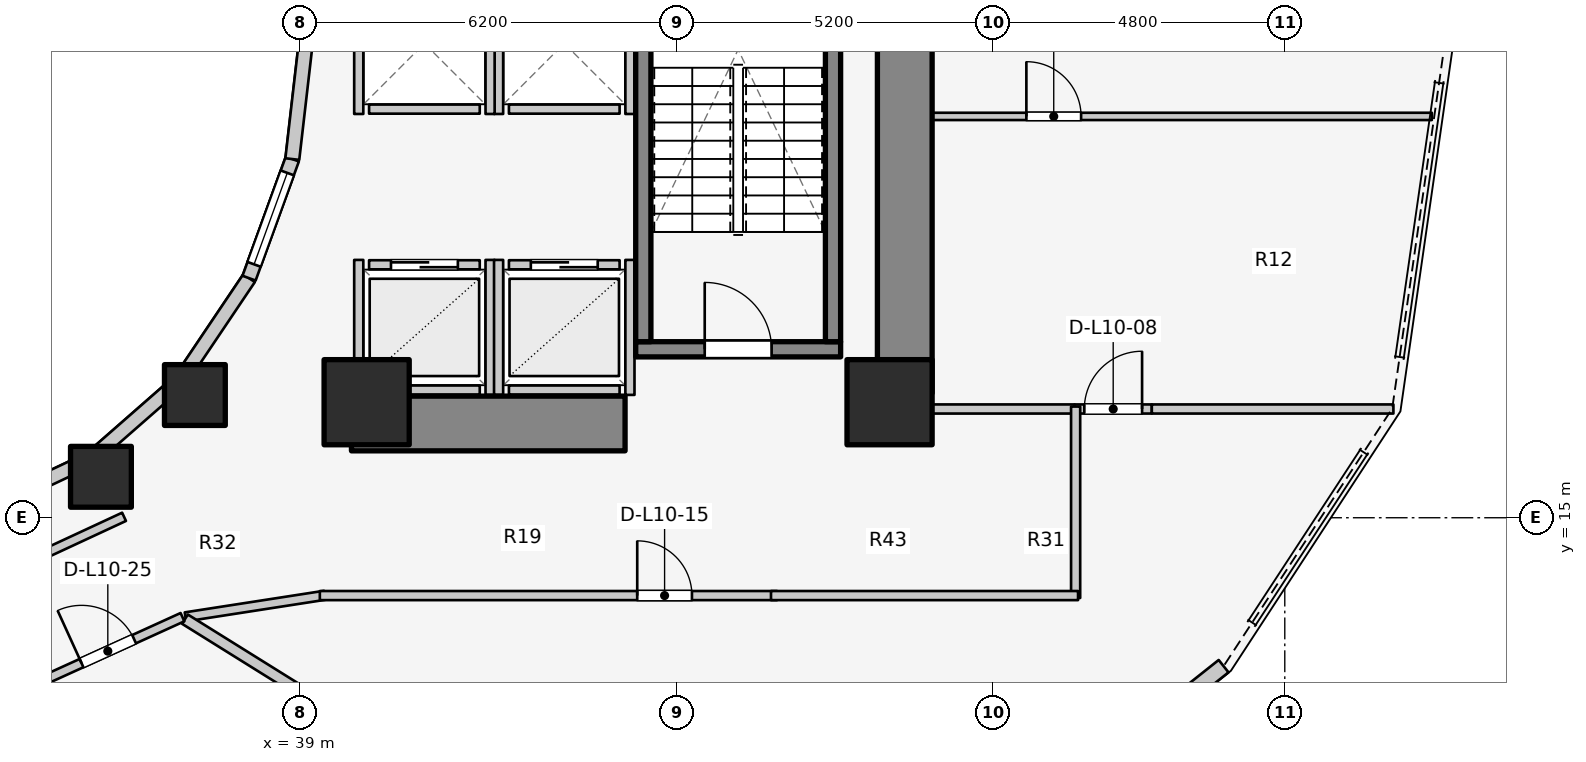
"""IFC4 building model, lengths in metres.
Left out: names, types, materials, properties, quantities, classifications, styles, units other than length and angle.
Written with IfcOpenShell. Run it as: python <this file> out.ifc"""

import sys

from ifc_helpers import new_model, si_unit, direction, frame, frame_2d, origin, origin_2d, place, context, subcontext, project, spatial, rectangle, extrude, element, fill, save


model = new_model("IFC4")
c1 = context("Model", 3, precision=1e-05, world=origin(), true_north=direction((0.0, 1.0)))
c2 = subcontext(c1, "Body", "Model", "MODEL_VIEW")
j1 = project(units=[si_unit("LENGTHUNIT", "METRE"), si_unit("PLANEANGLEUNIT", "RADIAN")], contexts=[c1])
p1 = place(None, origin())
s1 = spatial("IfcSite", under=j1, at=p1, CompositionType="ELEMENT")
p2 = place(p1, origin())
s2 = spatial("IfcBuilding", under=s1, at=p2, CompositionType="ELEMENT")
p3 = place(p2, frame((0.0, 0.0, 36.9)))
s3 = spatial("IfcBuildingStorey", under=s2, at=p3, CompositionType="ELEMENT", Elevation=36.9)
p4 = place(p3, frame((48.95, 17.05, 0.0), z_axis=(0.0, 0.0, 1.0), x_axis=(0.0, 1.0, 0.0)))
e1 = element("IfcWall", 1, at=p4, inside=s3, PredefinedType="SHEAR", context=c2, shape_type="SweptSolid", body=[
    extrude(rectangle(XDim=12.8, YDim=0.9, at=frame_2d((6.4, 0.0))), origin(), (0.0, 0.0, 1.0), 3.1),
])
p5 = place(p3, frame((39.85, 16.55, 0.0), z_axis=(0.0, 0.0, 1.0), x_axis=(1.0, 0.0, 0.0)))
e2 = element("IfcWall", 2, at=p5, inside=s3, PredefinedType="SHEAR", context=c2, shape_type="SweptSolid", body=[
    extrude(rectangle(XDim=4.5, YDim=0.9, at=frame_2d((2.25, 0.0))), origin(), (0.0, 0.0, 1.0), 3.1),
])
p6 = place(p3, frame((44.525, 17.77, 0.0), z_axis=(0.0, 0.0, 1.0), x_axis=(1.0, 0.0, 0.0)))
e3 = element("IfcWall", 3, at=p6, inside=s3, PredefinedType="SOLIDWALL", context=c2, shape_type="SweptSolid", body=[
    extrude(rectangle(XDim=3.37, YDim=0.25, at=frame_2d((1.685, 0.0))), origin(), (0.0, 0.0, 1.0), 3.1),
])
p7 = place(p6, frame((1.135, 0.0, 0.0)))
e4 = element("IfcOpeningElement", 4, at=p7, cuts=e3, PredefinedType="OPENING", context=c2, shape_type="SweptSolid", body=[
    extrude(rectangle(XDim=1.1, YDim=2.1, at=frame_2d((0.55, 1.05))), frame((0.0, 0.135, 0.0), z_axis=(0.0, -1.0, 0.0), x_axis=(1.0, 0.0, 0.0)), (0.0, 0.0, 1.0), 0.27),
])
for number, where, z_axis, x_axis in (
    (5, (44.65, 17.895, 0.0), (0.0, 0.0, 1.0), (0.0, 1.0, 0.0)),
    (6, (47.77, 17.895, 0.0), (0.0, 0.0, 1.0), (0.0, 1.0, 0.0)),
):
    element("IfcWall", number, at=place(p3, frame(where, z_axis=z_axis, x_axis=x_axis)), inside=s3, PredefinedType="SOLIDWALL", context=c2, shape_type="SweptSolid", body=[
        extrude(rectangle(XDim=7.81, YDim=0.25, at=frame_2d((3.905, 0.0))), origin(), (0.0, 0.0, 1.0), 3.1),
    ])
for number, where, z_axis, x_axis in (
    (7, (40.1, 16.9, 0.0), (0.0, 0.0, 1.0), (1.0, 0.0, 0.0)),
    (8, (48.7, 16.9, 0.0), (0.0, 0.0, 1.0), (1.0, 0.0, 0.0)),
):
    element("IfcColumn", number, at=place(p3, frame(where, z_axis=z_axis, x_axis=x_axis)), inside=s3, PredefinedType="COLUMN", context=c2, shape_type="SweptSolid", body=[
        extrude(rectangle(XDim=1.4, YDim=1.4, at=origin_2d()), origin(), (0.0, 0.0, 1.0), 3.1),
    ])
for number, where, z_axis, x_axis in (
    (9, (35.73, 15.673, 0.0), (0.0, 0.0, 1.0), (1.0, 0.0, 0.0)),
    (10, (37.275, 17.018, 0.0), (0.0, 0.0, 1.0), (1.0, 0.0, 0.0)),
):
    element("IfcColumn", number, at=place(p3, frame(where, z_axis=z_axis, x_axis=x_axis)), inside=s3, PredefinedType="COLUMN", context=c2, shape_type="SweptSolid", body=[
        extrude(rectangle(XDim=1.0, YDim=1.0, at=origin_2d()), origin(), (0.0, 0.0, 1.0), 3.1),
    ])
p8 = place(p3, frame((33.843, 15.157, 0.0), z_axis=(0.0, 0.0, 1.0), x_axis=(0.904179699603, 0.427152280606, 0.0)))
e11 = element("IfcWall", 11, at=p8, inside=s3, PredefinedType="STANDARD", context=c2, shape_type="SweptSolid", body=[
    extrude(rectangle(XDim=1.899, YDim=0.23, at=frame_2d((0.95, 0.0))), origin(), (0.0, 0.0, 1.0), 2.16),
])
p9 = place(p3, frame((35.56, 15.968, 0.0), z_axis=(0.0, 0.0, 1.0), x_axis=(0.752576694707, 0.658504607869, 0.0)))
e12 = element("IfcWall", 12, at=p9, inside=s3, PredefinedType="STANDARD", context=c2, shape_type="SweptSolid", body=[
    extrude(rectangle(XDim=1.959, YDim=0.23, at=frame_2d((0.98, 0.0))), origin(), (0.0, 0.0, 1.0), 2.16),
])
p10 = place(p3, frame((37.035, 17.258, 0.0), z_axis=(0.0, 0.0, 1.0), x_axis=(0.558197800898, 0.829707909492, 0.0)))
e13 = element("IfcWall", 13, at=p10, inside=s3, PredefinedType="STANDARD", context=c2, shape_type="SweptSolid", body=[
    extrude(rectangle(XDim=2.027, YDim=0.23, at=frame_2d((1.013, 0.0))), origin(), (0.0, 0.0, 1.0), 2.16),
])
p11 = place(p3, frame((38.166, 18.94, 0.0), z_axis=(0.0, 0.0, 1.0), x_axis=(0.341423187295, 0.93990968033, 0.0)))
e14 = element("IfcWall", 14, at=p11, inside=s3, PredefinedType="STANDARD", context=c2, shape_type="SweptSolid", body=[
    extrude(rectangle(XDim=2.084, YDim=0.23, at=frame_2d((1.042, 0.0))), origin(), (0.0, 0.0, 1.0), 2.84),
])
p12 = place(p11, frame((0.242, 0.0, 0.85)))
e15 = element("IfcOpeningElement", 15, at=p12, cuts=e14, PredefinedType="OPENING", context=c2, shape_type="SweptSolid", body=[
    extrude(rectangle(XDim=1.6, YDim=1.65, at=frame_2d((0.8, 0.825))), frame((0.0, 0.125, 0.0), z_axis=(0.0, -1.0, 0.0), x_axis=(1.0, 0.0, 0.0)), (0.0, 0.0, 1.0), 0.25),
])
p13 = place(p3, frame((38.877, 20.898, 0.0), z_axis=(0.0, 0.0, 1.0), x_axis=(0.114711713601, 0.993398823617, 0.0)))
e16 = element("IfcWall", 16, at=p13, inside=s3, PredefinedType="STANDARD", context=c2, shape_type="SweptSolid", body=[
    extrude(rectangle(XDim=2.115, YDim=0.23, at=frame_2d((1.058, 0.0))), origin(), (0.0, 0.0, 1.0), 2.84),
])
p14 = place(p3, frame((50.405, 9.55, 0.0), z_axis=(0.0, 0.0, 1.0), x_axis=(0.783123133379, 0.621866672179, 0.0)))
e17 = element("IfcWall", 17, at=p14, inside=s3, PredefinedType="STANDARD", context=c2, shape_type="SweptSolid", body=[
    extrude(rectangle(XDim=4.839, YDim=0.26, at=frame_2d((2.419, 0.0))), origin(), (0.0, 0.0, 1.0), 2.85),
])
p15 = place(p14, frame((1.669, 0.0, 0.75)))
e18 = element("IfcOpeningElement", 18, at=p15, cuts=e17, PredefinedType="OPENING", context=c2, shape_type="SweptSolid", body=[
    extrude(rectangle(XDim=1.5, YDim=1.6, at=frame_2d((0.75, 0.8))), frame((0.0, 0.14, 0.0), z_axis=(0.0, -1.0, 0.0), x_axis=(1.0, 0.0, 0.0)), (0.0, 0.0, 1.0), 0.28),
])
p16 = place(p3, frame((40.14, 19.16, 0.0), z_axis=(0.0, 0.0, 1.0), x_axis=(1.0, 0.0, 0.0)))
e19 = element("IfcWall", 19, at=p16, inside=s3, PredefinedType="SOLIDWALL", context=c2, shape_type="SweptSolid", body=[
    extrude(rectangle(XDim=1.82, YDim=0.15, at=frame_2d((0.91, 0.0))), origin(), (0.0, 0.0, 1.0), 2.12),
])
p17 = place(p16, frame((0.36, 0.0, 0.0)))
e20 = element("IfcOpeningElement", 20, at=p17, cuts=e19, PredefinedType="OPENING", context=c2, shape_type="SweptSolid", body=[
    extrude(rectangle(XDim=1.1, YDim=2.1, at=frame_2d((0.55, 1.05))), frame((0.0, 0.085, 0.0), z_axis=(0.0, -1.0, 0.0), x_axis=(1.0, 0.0, 0.0)), (0.0, 0.0, 1.0), 0.17),
])
p18 = place(p3, frame((40.14, 17.1, 0.0), z_axis=(0.0, 0.0, 1.0), x_axis=(1.0, 0.0, 0.0)))
e21 = element("IfcWall", 21, at=p18, inside=s3, PredefinedType="SOLIDWALL", context=c2, shape_type="SweptSolid", body=[
    extrude(rectangle(XDim=1.82, YDim=0.15, at=frame_2d((0.91, 0.0))), origin(), (0.0, 0.0, 1.0), 2.12),
])
p19 = place(p3, frame((39.97, 17.02, 0.0), z_axis=(0.0, 0.0, 1.0), x_axis=(0.0, 1.0, 0.0)))
e22 = element("IfcWall", 22, at=p19, inside=s3, PredefinedType="SOLIDWALL", context=c2, shape_type="SweptSolid", body=[
    extrude(rectangle(XDim=2.22, YDim=0.15, at=frame_2d((1.11, 0.0))), origin(), (0.0, 0.0, 1.0), 2.12),
])
p20 = place(p3, frame((42.13, 17.02, 0.0), z_axis=(0.0, 0.0, 1.0), x_axis=(0.0, 1.0, 0.0)))
e23 = element("IfcWall", 23, at=p20, inside=s3, PredefinedType="SOLIDWALL", context=c2, shape_type="SweptSolid", body=[
    extrude(rectangle(XDim=2.22, YDim=0.15, at=frame_2d((1.11, 0.0))), origin(), (0.0, 0.0, 1.0), 2.855),
])
p21 = place(p3, frame((42.44, 19.16, 0.0), z_axis=(0.0, 0.0, 1.0), x_axis=(1.0, 0.0, 0.0)))
e24 = element("IfcWall", 24, at=p21, inside=s3, PredefinedType="SOLIDWALL", context=c2, shape_type="SweptSolid", body=[
    extrude(rectangle(XDim=1.82, YDim=0.15, at=frame_2d((0.91, 0.0))), origin(), (0.0, 0.0, 1.0), 2.855),
])
p22 = place(p21, frame((0.36, 0.0, 0.0)))
e25 = element("IfcOpeningElement", 25, at=p22, cuts=e24, PredefinedType="OPENING", context=c2, shape_type="SweptSolid", body=[
    extrude(rectangle(XDim=1.1, YDim=2.1, at=frame_2d((0.55, 1.05))), frame((0.0, 0.085, 0.0), z_axis=(0.0, -1.0, 0.0), x_axis=(1.0, 0.0, 0.0)), (0.0, 0.0, 1.0), 0.17),
])
p23 = place(p3, frame((42.44, 17.1, 0.0), z_axis=(0.0, 0.0, 1.0), x_axis=(1.0, 0.0, 0.0)))
e26 = element("IfcWall", 26, at=p23, inside=s3, PredefinedType="SOLIDWALL", context=c2, shape_type="SweptSolid", body=[
    extrude(rectangle(XDim=1.82, YDim=0.15, at=frame_2d((0.91, 0.0))), origin(), (0.0, 0.0, 1.0), 2.855),
])
p24 = place(p3, frame((42.27, 17.02, 0.0), z_axis=(0.0, 0.0, 1.0), x_axis=(0.0, 1.0, 0.0)))
e27 = element("IfcWall", 27, at=p24, inside=s3, PredefinedType="SOLIDWALL", context=c2, shape_type="SweptSolid", body=[
    extrude(rectangle(XDim=2.22, YDim=0.15, at=frame_2d((1.11, 0.0))), origin(), (0.0, 0.0, 1.0), 2.855),
])
p25 = place(p3, frame((44.43, 17.02, 0.0), z_axis=(0.0, 0.0, 1.0), x_axis=(0.0, 1.0, 0.0)))
e28 = element("IfcWall", 28, at=p25, inside=s3, PredefinedType="SOLIDWALL", context=c2, shape_type="SweptSolid", body=[
    extrude(rectangle(XDim=2.22, YDim=0.15, at=frame_2d((1.11, 0.0))), origin(), (0.0, 0.0, 1.0), 2.12),
])
p26 = place(p3, frame((42.44, 21.72, 0.0), z_axis=(0.0, 0.0, 1.0), x_axis=(1.0, 0.0, 0.0)))
e29 = element("IfcWall", 29, at=p26, inside=s3, PredefinedType="SOLIDWALL", context=c2, shape_type="SweptSolid", body=[
    extrude(rectangle(XDim=1.82, YDim=0.15, at=frame_2d((0.91, 0.0))), origin(), (0.0, 0.0, 1.0), 2.855),
])
for number, where, z_axis, x_axis in (
    (30, (42.27, 21.64, 0.0), (0.0, 0.0, 1.0), (0.0, 1.0, 0.0)),
    (31, (44.43, 21.64, 0.0), (0.0, 0.0, 1.0), (0.0, 1.0, 0.0)),
):
    element("IfcWall", number, at=place(p3, frame(where, z_axis=z_axis, x_axis=x_axis)), inside=s3, PredefinedType="SOLIDWALL", context=c2, shape_type="SweptSolid", body=[
        extrude(rectangle(XDim=2.32, YDim=0.15, at=frame_2d((1.16, 0.0))), origin(), (0.0, 0.0, 1.0), 2.855),
    ])
p27 = place(p3, frame((40.14, 21.72, 0.0), z_axis=(0.0, 0.0, 1.0), x_axis=(1.0, 0.0, 0.0)))
e32 = element("IfcWall", 32, at=p27, inside=s3, PredefinedType="SOLIDWALL", context=c2, shape_type="SweptSolid", body=[
    extrude(rectangle(XDim=1.82, YDim=0.15, at=frame_2d((0.91, 0.0))), origin(), (0.0, 0.0, 1.0), 2.12),
])
p28 = place(p3, frame((39.97, 21.64, 0.0), z_axis=(0.0, 0.0, 1.0), x_axis=(0.0, 1.0, 0.0)))
e33 = element("IfcWall", 33, at=p28, inside=s3, PredefinedType="SOLIDWALL", context=c2, shape_type="SweptSolid", body=[
    extrude(rectangle(XDim=2.32, YDim=0.15, at=frame_2d((1.16, 0.0))), origin(), (0.0, 0.0, 1.0), 2.12),
])
p29 = place(p3, frame((42.13, 21.64, 0.0), z_axis=(0.0, 0.0, 1.0), x_axis=(0.0, 1.0, 0.0)))
e34 = element("IfcWall", 34, at=p29, inside=s3, PredefinedType="SOLIDWALL", context=c2, shape_type="SweptSolid", body=[
    extrude(rectangle(XDim=2.32, YDim=0.15, at=frame_2d((1.16, 0.0))), origin(), (0.0, 0.0, 1.0), 2.855),
])
p30 = place(p3, frame((34.127, 14.094, 0.0), z_axis=(0.0, 0.0, 1.0), x_axis=(0.906943449489, 0.421252393975, 0.0)))
e35 = element("IfcWall", 35, at=p30, inside=s3, PredefinedType="PARTITIONING", context=c2, shape_type="SweptSolid", body=[
    extrude(rectangle(XDim=2.186, YDim=0.15, at=frame_2d((1.093, 0.0))), origin(), (0.0, 0.0, 1.0), 2.237),
])
p31 = place(p3, frame((48.95, 16.788, 0.0), z_axis=(0.0, 0.0, 1.0), x_axis=(1.0, 0.0, 0.0)))
e36 = element("IfcWall", 36, at=p31, inside=s3, PredefinedType="PARTITIONING", context=c2, shape_type="SweptSolid", body=[
    extrude(rectangle(XDim=2.793, YDim=0.15, at=frame_2d((1.396, 0.0))), origin(), (0.0, 0.0, 1.0), 2.069),
])
p32 = place(p3, frame((51.743, 16.788, 0.0), z_axis=(0.0, 0.0, 1.0), x_axis=(1.0, 0.0, 0.0)))
e37 = element("IfcWall", 37, at=p32, inside=s3, PredefinedType="PARTITIONING", context=c2, shape_type="SweptSolid", body=[
    extrude(rectangle(XDim=1.27, YDim=0.15, at=frame_2d((0.635, 0.0))), origin(), (0.0, 0.0, 1.0), 2.855),
])
p33 = place(p32, frame((0.16, 0.0, 0.0)))
e38 = element("IfcOpeningElement", 38, at=p33, cuts=e37, PredefinedType="OPENING", context=c2, shape_type="SweptSolid", body=[
    extrude(rectangle(XDim=0.95, YDim=2.1, at=frame_2d((0.475, 1.05))), frame((0.0, 0.085, 0.0), z_axis=(0.0, -1.0, 0.0), x_axis=(1.0, 0.0, 0.0)), (0.0, 0.0, 1.0), 0.17),
])
p34 = place(p3, frame((53.013, 16.788, 0.0), z_axis=(0.0, 0.0, 1.0), x_axis=(1.0, 0.0, 0.0)))
e39 = element("IfcWall", 39, at=p34, inside=s3, PredefinedType="PARTITIONING", context=c2, shape_type="SweptSolid", body=[
    extrude(rectangle(XDim=3.973, YDim=0.15, at=frame_2d((1.987, 0.0))), origin(), (0.0, 0.0, 1.0), 2.855),
])
p35 = place(p3, frame((48.95, 21.6, 0.0), z_axis=(0.0, 0.0, 1.0), x_axis=(1.0, 0.0, 0.0)))
e40 = element("IfcWall", 40, at=p35, inside=s3, PredefinedType="MOVABLE", context=c2, shape_type="SweptSolid", body=[
    extrude(rectangle(XDim=8.669, YDim=0.12, at=frame_2d((4.334, 0.0))), origin(), (0.0, 0.0, 1.0), 2.855),
])
p36 = place(p35, frame((2.0, 0.0, 0.0)))
e41 = element("IfcOpeningElement", 41, at=p36, cuts=e40, PredefinedType="OPENING", context=c2, shape_type="SweptSolid", body=[
    extrude(rectangle(XDim=0.9, YDim=2.1, at=frame_2d((0.45, 1.05))), frame((0.0, 0.07, 0.0), z_axis=(0.0, -1.0, 0.0), x_axis=(1.0, 0.0, 0.0)), (0.0, 0.0, 1.0), 0.14),
])
p37 = place(p3, frame((51.76, 13.68, 0.0), z_axis=(0.0, 0.0, 1.0), x_axis=(0.0, 1.0, 0.0)))
e42 = element("IfcWall", 42, at=p37, inside=s3, PredefinedType="PARTITIONING", context=c2, shape_type="SweptSolid", body=[
    extrude(rectangle(XDim=3.148, YDim=0.15, at=frame_2d((1.574, 0.0))), origin(), (0.0, 0.0, 1.0), 2.855),
])
p38 = place(p3, frame((37.119, 13.369, 0.0), z_axis=(0.0, 0.0, 1.0), x_axis=(0.988184633586, 0.153268163508, 0.0)))
e43 = element("IfcWall", 43, at=p38, inside=s3, PredefinedType="PARTITIONING", context=c2, shape_type="SweptSolid", body=[
    extrude(rectangle(XDim=2.318, YDim=0.15, at=frame_2d((1.159, 0.0))), origin(), (0.0, 0.0, 1.0), 2.237),
])
p39 = place(p3, frame((39.33, 13.72, 0.0), z_axis=(0.0, 0.0, 1.0), x_axis=(1.0, 0.0, 0.0)))
e44 = element("IfcWall", 44, at=p39, inside=s3, PredefinedType="PARTITIONING", context=c2, shape_type="SweptSolid", body=[
    extrude(rectangle(XDim=7.52, YDim=0.15, at=frame_2d((3.76, 0.0))), origin(), (0.0, 0.0, 1.0), 2.237),
])
p40 = place(p39, frame((5.22, 0.0, 0.0)))
e45 = element("IfcOpeningElement", 45, at=p40, cuts=e44, PredefinedType="OPENING", context=c2, shape_type="SweptSolid", body=[
    extrude(rectangle(XDim=0.9, YDim=2.1, at=frame_2d((0.45, 1.05))), frame((0.0, 0.085, 0.0), z_axis=(0.0, -1.0, 0.0), x_axis=(1.0, 0.0, 0.0)), (0.0, 0.0, 1.0), 0.17),
])
p41 = place(p3, frame((46.75, 13.72, 0.0), z_axis=(0.0, 0.0, 1.0), x_axis=(1.0, 0.0, 0.0)))
e46 = element("IfcWall", 46, at=p41, inside=s3, PredefinedType="PARTITIONING", context=c2, shape_type="SweptSolid", body=[
    extrude(rectangle(XDim=5.05, YDim=0.15, at=frame_2d((2.525, 0.0))), origin(), (0.0, 0.0, 1.0), 2.069),
])
p42 = place(p3, frame((37.112, 13.332, 0.0), z_axis=(0.0, 0.0, 1.0), x_axis=(0.848647785721, -0.52895834977, 0.0)))
e47 = element("IfcWall", 47, at=p42, inside=s3, PredefinedType="PARTITIONING", context=c2, shape_type="SweptSolid", body=[
    extrude(rectangle(XDim=9.81, YDim=0.18, at=frame_2d((4.905, 0.0))), origin(), (0.0, 0.0, 1.0), 2.237),
])
p43 = place(p3, frame((34.587, 12.285, 0.0), z_axis=(0.0, 0.0, 1.0), x_axis=(0.687544693502, -0.72614206216, 0.0)))
e48 = element("IfcWall", 48, at=p43, inside=s3, PredefinedType="PLUMBINGWALL", context=c2, shape_type="SweptSolid", body=[
    extrude(rectangle(XDim=2.1, YDim=0.14, at=frame_2d((1.05, 0.0))), origin(), (0.0, 0.0, 1.0), 2.855),
])
p44 = place(p3, frame((34.615, 12.247, 0.0), z_axis=(0.0, 0.0, 1.0), x_axis=(0.910186679378, 0.414198272186, 0.0)))
e49 = element("IfcWall", 49, at=p44, inside=s3, PredefinedType="PARTITIONING", context=c2, shape_type="SweptSolid", body=[
    extrude(rectangle(XDim=2.698, YDim=0.15, at=frame_2d((1.349, 0.0))), origin(), (0.0, 0.0, 1.0), 2.237),
])
p45 = place(p44, frame((0.874, 0.0, 0.0)))
e50 = element("IfcOpeningElement", 50, at=p45, cuts=e49, PredefinedType="OPENING", context=c2, shape_type="SweptSolid", body=[
    extrude(rectangle(XDim=0.95, YDim=2.1, at=frame_2d((0.475, 1.05))), frame((0.0, 0.085, 0.0), z_axis=(0.0, -1.0, 0.0), x_axis=(1.0, 0.0, 0.0)), (0.0, 0.0, 1.0), 0.17),
])
p46 = place(p12, origin())
e51 = element("IfcWindow", 51, at=p46, inside=s3, PartitioningType="SINGLE_PANEL", PredefinedType="WINDOW", context=c2, shape_type="SweptSolid", body=[
    extrude(rectangle(XDim=1.6, YDim=1.65, at=frame_2d((0.8, 0.825))), frame((0.0, 0.03, 0.0), z_axis=(0.0, -1.0, 0.0), x_axis=(1.0, 0.0, 0.0)), (0.0, 0.0, 1.0), 0.06),
])
fill(e15, e51)
p47 = place(p7, origin())
e52 = element("IfcDoor", 52, at=p47, inside=s3, OperationType="SINGLE_SWING_LEFT", PredefinedType="DOOR", context=c2, shape_type="SweptSolid", body=[
    extrude(rectangle(XDim=1.1, YDim=2.1, at=frame_2d((0.55, 1.05))), frame((0.0, 0.025, 0.0), z_axis=(0.0, -1.0, 0.0), x_axis=(1.0, 0.0, 0.0)), (0.0, 0.0, 1.0), 0.05),
])
fill(e4, e52)
p48 = place(p17, origin())
e53 = element("IfcDoor", 53, at=p48, inside=s3, OperationType="DOUBLE_DOOR_SLIDING", PredefinedType="DOOR", context=c2, shape_type="SweptSolid", body=[
    extrude(rectangle(XDim=1.1, YDim=2.1, at=frame_2d((0.55, 1.05))), frame((0.0, 0.025, 0.0), z_axis=(0.0, -1.0, 0.0), x_axis=(1.0, 0.0, 0.0)), (0.0, 0.0, 1.0), 0.05),
])
fill(e20, e53)
p49 = place(p22, origin())
e54 = element("IfcDoor", 54, at=p49, inside=s3, OperationType="DOUBLE_DOOR_SLIDING", PredefinedType="DOOR", context=c2, shape_type="SweptSolid", body=[
    extrude(rectangle(XDim=1.1, YDim=2.1, at=frame_2d((0.55, 1.05))), frame((0.0, 0.025, 0.0), z_axis=(0.0, -1.0, 0.0), x_axis=(1.0, 0.0, 0.0)), (0.0, 0.0, 1.0), 0.05),
])
fill(e25, e54)
p50 = place(p33, origin())
e55 = element("IfcDoor", 55, at=p50, inside=s3, OperationType="SINGLE_SWING_RIGHT", PredefinedType="DOOR", context=c2, shape_type="SweptSolid", body=[
    extrude(rectangle(XDim=0.95, YDim=2.1, at=frame_2d((0.475, 1.05))), frame((0.0, 0.025, 0.0), z_axis=(0.0, -1.0, 0.0), x_axis=(1.0, 0.0, 0.0)), (0.0, 0.0, 1.0), 0.05),
])
fill(e38, e55)
p51 = place(p36, origin())
e56 = element("IfcDoor", 56, at=p51, inside=s3, OperationType="SINGLE_SWING_LEFT", PredefinedType="DOOR", context=c2, shape_type="SweptSolid", body=[
    extrude(rectangle(XDim=0.9, YDim=2.1, at=frame_2d((0.45, 1.05))), frame((0.0, 0.025, 0.0), z_axis=(0.0, -1.0, 0.0), x_axis=(1.0, 0.0, 0.0)), (0.0, 0.0, 1.0), 0.05),
])
fill(e41, e56)
p52 = place(p40, origin())
e57 = element("IfcDoor", 57, at=p52, inside=s3, OperationType="SINGLE_SWING_LEFT", PredefinedType="DOOR", context=c2, shape_type="SweptSolid", body=[
    extrude(rectangle(XDim=0.9, YDim=2.1, at=frame_2d((0.45, 1.05))), frame((0.0, 0.025, 0.0), z_axis=(0.0, -1.0, 0.0), x_axis=(1.0, 0.0, 0.0)), (0.0, 0.0, 1.0), 0.05),
])
fill(e45, e57)
p53 = place(p45, origin())
e58 = element("IfcDoor", 58, at=p53, inside=s3, OperationType="SINGLE_SWING_LEFT", PredefinedType="DOOR", context=c2, shape_type="SweptSolid", body=[
    extrude(rectangle(XDim=0.95, YDim=2.1, at=frame_2d((0.475, 1.05))), frame((0.0, 0.025, 0.0), z_axis=(0.0, -1.0, 0.0), x_axis=(1.0, 0.0, 0.0)), (0.0, 0.0, 1.0), 0.05),
])
fill(e50, e58)
save(model, sys.argv[1])
